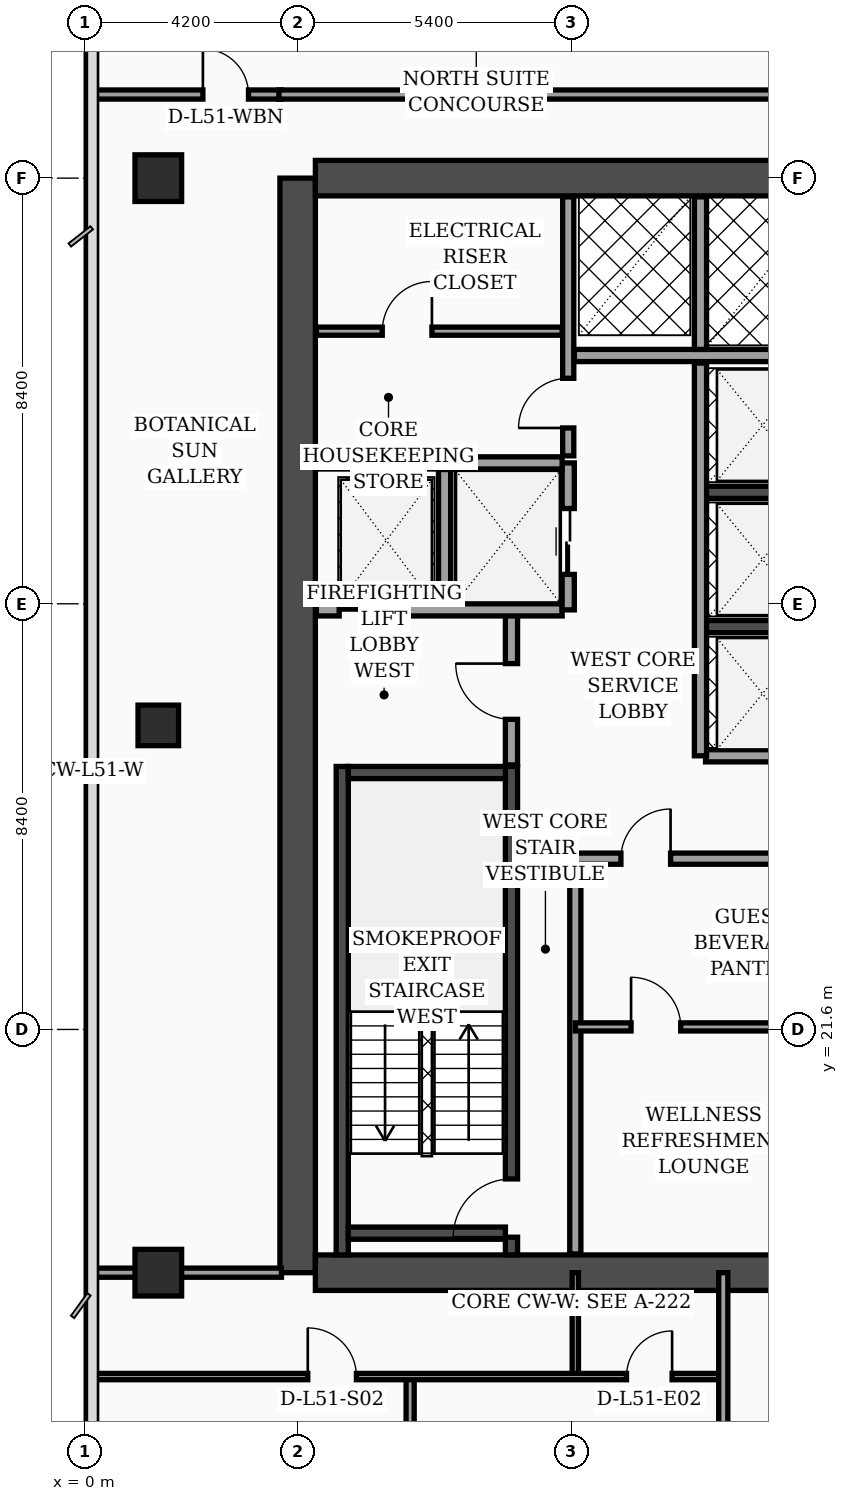
"""IFC4 building model, lengths in metres.
Left out: names, types, materials, properties, quantities, classifications, styles, units other than length and angle.
Written with IfcOpenShell. Run it as: python <this file> out.ifc"""

import sys

from ifc_helpers import new_model, si_unit, direction, frame, frame_2d, origin, origin_2d, place, context, subcontext, project, spatial, rectangle, extrude, element, fill, save


model = new_model("IFC4")
c1 = context("Model", 3, precision=1e-05, world=origin(), true_north=direction((0.0, 1.0)))
c2 = subcontext(c1, "Body", "Model", "MODEL_VIEW")
j1 = project(units=[si_unit("LENGTHUNIT", "METRE"), si_unit("PLANEANGLEUNIT", "RADIAN")], contexts=[c1])
p1 = place(None, origin())
s1 = spatial("IfcSite", under=j1, at=p1, CompositionType="ELEMENT")
p2 = place(p1, origin())
s2 = spatial("IfcBuilding", under=s1, at=p2, CompositionType="ELEMENT")
p3 = place(p2, frame((0.0, 0.0, 207.2)))
s3 = spatial("IfcBuildingStorey", under=s2, at=p3, CompositionType="ELEMENT", Elevation=207.2)
p4 = place(p3, frame((4.2, 16.8, 0.0), z_axis=(0.0, 0.0, 1.0), x_axis=(0.0, 1.0, 0.0)))
e1 = element("IfcWall", 1, at=p4, inside=s3, PredefinedType="SHEAR", context=c2, shape_type="SweptSolid", body=[
    extrude(rectangle(XDim=21.6, YDim=0.7, at=frame_2d((10.8, 0.0))), origin(), (0.0, 0.0, 1.0), 3.56),
])
for number, where, z_axis, x_axis in (
    (2, (4.55, 38.4, 0.0), (0.0, 0.0, 1.0), (1.0, 0.0, 0.0)),
    (3, (4.55, 16.8, 0.0), (0.0, 0.0, 1.0), (1.0, 0.0, 0.0)),
):
    element("IfcWall", number, at=place(p3, frame(where, z_axis=z_axis, x_axis=x_axis)), inside=s3, PredefinedType="SHEAR", context=c2, shape_type="SweptSolid", body=[
        extrude(rectangle(XDim=10.1, YDim=0.7, at=frame_2d((5.05, 0.0))), origin(), (0.0, 0.0, 1.0), 3.56),
    ])
p5 = place(p3, frame((5.08, 17.15, 0.0), z_axis=(0.0, 0.0, 1.0), x_axis=(0.0, 1.0, 0.0)))
e4 = element("IfcWall", 4, at=p5, inside=s3, PredefinedType="SOLIDWALL", context=c2, shape_type="SweptSolid", body=[
    extrude(rectangle(XDim=9.64, YDim=0.24, at=frame_2d((4.82, 0.0))), origin(), (0.0, 0.0, 1.0), 3.56),
])
p6 = place(p3, frame((8.42, 17.15, 0.0), z_axis=(0.0, 0.0, 1.0), x_axis=(0.0, 1.0, 0.0)))
e5 = element("IfcWall", 5, at=p6, inside=s3, PredefinedType="SOLIDWALL", context=c2, shape_type="SweptSolid", body=[
    extrude(rectangle(XDim=9.64, YDim=0.24, at=frame_2d((4.82, 0.0))), origin(), (0.0, 0.0, 1.0), 3.56),
])
p7 = place(p6, frame((0.35, 0.0, 0.0)))
e6 = element("IfcOpeningElement", 6, at=p7, cuts=e5, PredefinedType="OPENING", context=c2, shape_type="SweptSolid", body=[
    extrude(rectangle(XDim=1.15, YDim=2.2, at=frame_2d((0.575, 1.1))), frame((0.0, 0.13, 0.0), z_axis=(0.0, -1.0, 0.0), x_axis=(1.0, 0.0, 0.0)), (0.0, 0.0, 1.0), 0.26),
])
for number, where, z_axis, x_axis in (
    (7, (5.2, 17.58, 0.0), (0.0, 0.0, 1.0), (1.0, 0.0, 0.0)),
    (8, (5.2, 26.67, 0.0), (0.0, 0.0, 1.0), (1.0, 0.0, 0.0)),
):
    element("IfcWall", number, at=place(p3, frame(where, z_axis=z_axis, x_axis=x_axis)), inside=s3, PredefinedType="SOLIDWALL", context=c2, shape_type="SweptSolid", body=[
        extrude(rectangle(XDim=3.1, YDim=0.24, at=frame_2d((1.55, 0.0))), origin(), (0.0, 0.0, 1.0), 3.56),
    ])
for number, where, z_axis, x_axis in (
    (9, (12.18, 29.55, 0.0), (0.0, 0.0, 1.0), (1.0, 0.0, 0.0)),
    (10, (12.18, 32.2, 0.0), (0.0, 0.0, 1.0), (1.0, 0.0, 0.0)),
):
    element("IfcWall", number, at=place(p3, frame(where, z_axis=z_axis, x_axis=x_axis)), inside=s3, PredefinedType="SOLIDWALL", context=c2, shape_type="SweptSolid", body=[
        extrude(rectangle(XDim=2.47, YDim=0.24, at=frame_2d((1.235, 0.0))), origin(), (0.0, 0.0, 1.0), 3.56),
    ])
p8 = place(p3, frame((1.45, 16.8, 0.0), z_axis=(0.0, 0.0, 1.0), x_axis=(1.0, 0.0, 0.0)))
e11 = element("IfcColumn", 11, at=p8, inside=s3, PredefinedType="COLUMN", context=c2, shape_type="SweptSolid", body=[
    extrude(rectangle(XDim=0.92, YDim=0.92, at=origin_2d()), origin(), (0.0, 0.0, 1.0), 3.56),
])
p9 = place(p3, frame((1.45, 27.6, 0.0), z_axis=(0.0, 0.0, 1.0), x_axis=(1.0, 0.0, 0.0)))
e12 = element("IfcColumn", 12, at=p9, inside=s3, PredefinedType="COLUMN", context=c2, shape_type="SweptSolid", body=[
    extrude(rectangle(XDim=0.8, YDim=0.8, at=origin_2d()), origin(), (0.0, 0.0, 1.0), 3.56),
])
p10 = place(p3, frame((1.45, 38.4, 0.0), z_axis=(0.0, 0.0, 1.0), x_axis=(1.0, 0.0, 0.0)))
e13 = element("IfcColumn", 13, at=p10, inside=s3, PredefinedType="COLUMN", context=c2, shape_type="SweptSolid", body=[
    extrude(rectangle(XDim=0.92, YDim=0.92, at=origin_2d()), origin(), (0.0, 0.0, 1.0), 3.56),
])
p11 = place(p3, frame((8.42, 26.82, 0.0), z_axis=(0.0, 0.0, 1.0), x_axis=(0.0, 1.0, 0.0)))
e14 = element("IfcWall", 14, at=p11, inside=s3, PredefinedType="SOLIDWALL", context=c2, shape_type="SweptSolid", body=[
    extrude(rectangle(XDim=3.0, YDim=0.24, at=frame_2d((1.5, 0.0))), origin(), (0.0, 0.0, 1.0), 3.56),
])
p12 = place(p11, frame((0.9, 0.0, 0.0)))
e15 = element("IfcOpeningElement", 15, at=p12, cuts=e14, PredefinedType="OPENING", context=c2, shape_type="SweptSolid", body=[
    extrude(rectangle(XDim=1.1, YDim=2.2, at=frame_2d((0.55, 1.1))), frame((0.0, 0.13, 0.0), z_axis=(0.0, -1.0, 0.0), x_axis=(1.0, 0.0, 0.0)), (0.0, 0.0, 1.0), 0.26),
])
p13 = place(p3, frame((4.57, 29.88, 0.0), z_axis=(0.0, 0.0, 1.0), x_axis=(1.0, 0.0, 0.0)))
e16 = element("IfcWall", 16, at=p13, inside=s3, PredefinedType="SOLIDWALL", context=c2, shape_type="SweptSolid", body=[
    extrude(rectangle(XDim=4.85, YDim=0.24, at=frame_2d((2.425, 0.0))), origin(), (0.0, 0.0, 1.0), 3.56),
])
p14 = place(p13, frame((0.45, 0.0, 0.0)))
e17 = element("IfcOpeningElement", 17, at=p14, cuts=e16, PredefinedType="OPENING", context=c2, shape_type="SweptSolid", body=[
    extrude(rectangle(XDim=1.3, YDim=2.35, at=frame_2d((0.65, 1.175))), frame((0.0, 0.13, 0.0), z_axis=(0.0, -1.0, 0.0), x_axis=(1.0, 0.0, 0.0)), (0.0, 0.0, 1.0), 0.26),
])
p15 = place(p3, frame((7.1, 30.02, 0.0), z_axis=(0.0, 0.0, 1.0), x_axis=(0.0, 1.0, 0.0)))
e18 = element("IfcWall", 18, at=p15, inside=s3, PredefinedType="SOLIDWALL", context=c2, shape_type="SweptSolid", body=[
    extrude(rectangle(XDim=2.63, YDim=0.24, at=frame_2d((1.315, 0.0))), origin(), (0.0, 0.0, 1.0), 3.56),
])
p16 = place(p3, frame((9.54, 29.88, 0.0), z_axis=(0.0, 0.0, 1.0), x_axis=(0.0, 1.0, 0.0)))
e19 = element("IfcWall", 19, at=p16, inside=s3, PredefinedType="SOLIDWALL", context=c2, shape_type="SweptSolid", body=[
    extrude(rectangle(XDim=2.9, YDim=0.24, at=frame_2d((1.45, 0.0))), origin(), (0.0, 0.0, 1.0), 3.56),
])
p17 = place(p16, frame((0.7, 0.0, 0.0)))
e20 = element("IfcOpeningElement", 20, at=p17, cuts=e19, PredefinedType="OPENING", context=c2, shape_type="SweptSolid", body=[
    extrude(rectangle(XDim=1.3, YDim=2.35, at=frame_2d((0.65, 1.175))), frame((0.0, 0.13, 0.0), z_axis=(0.0, -1.0, 0.0), x_axis=(1.0, 0.0, 0.0)), (0.0, 0.0, 1.0), 0.26),
])
p18 = place(p3, frame((4.57, 32.78, 0.0), z_axis=(0.0, 0.0, 1.0), x_axis=(1.0, 0.0, 0.0)))
e21 = element("IfcWall", 21, at=p18, inside=s3, PredefinedType="SOLIDWALL", context=c2, shape_type="SweptSolid", body=[
    extrude(rectangle(XDim=4.85, YDim=0.24, at=frame_2d((2.425, 0.0))), origin(), (0.0, 0.0, 1.0), 3.19),
])
p19 = place(p3, frame((9.68, 17.17, 0.0), z_axis=(0.0, 0.0, 1.0), x_axis=(0.0, 1.0, 0.0)))
e22 = element("IfcWall", 22, at=p19, inside=s3, PredefinedType="SOLIDWALL", context=c2, shape_type="SweptSolid", body=[
    extrude(rectangle(XDim=7.83, YDim=0.22, at=frame_2d((3.915, 0.0))), origin(), (0.0, 0.0, 1.0), 3.56),
])
p20 = place(p3, frame((4.57, 35.38, 0.0), z_axis=(0.0, 0.0, 1.0), x_axis=(1.0, 0.0, 0.0)))
e23 = element("IfcWall", 23, at=p20, inside=s3, PredefinedType="PARTITIONING", context=c2, shape_type="SweptSolid", body=[
    extrude(rectangle(XDim=4.85, YDim=0.16, at=frame_2d((2.425, 0.0))), origin(), (0.0, 0.0, 1.0), 3.56),
])
p21 = place(p20, frame((1.3, 0.0, 0.0)))
e24 = element("IfcOpeningElement", 24, at=p21, cuts=e23, PredefinedType="OPENING", context=c2, shape_type="SweptSolid", body=[
    extrude(rectangle(XDim=0.98, YDim=2.15, at=frame_2d((0.49, 1.075))), frame((0.0, 0.09, 0.0), z_axis=(0.0, -1.0, 0.0), x_axis=(1.0, 0.0, 0.0)), (0.0, 0.0, 1.0), 0.18),
])
p22 = place(p3, frame((9.54, 32.92, 0.0), z_axis=(0.0, 0.0, 1.0), x_axis=(0.0, 1.0, 0.0)))
e25 = element("IfcWall", 25, at=p22, inside=s3, PredefinedType="SOLIDWALL", context=c2, shape_type="SweptSolid", body=[
    extrude(rectangle(XDim=5.11, YDim=0.22, at=frame_2d((2.555, 0.0))), origin(), (0.0, 0.0, 1.0), 3.56),
])
p23 = place(p22, frame((0.55, 0.0, 0.0)))
e26 = element("IfcOpeningElement", 26, at=p23, cuts=e25, PredefinedType="OPENING", context=c2, shape_type="SweptSolid", body=[
    extrude(rectangle(XDim=0.98, YDim=2.15, at=frame_2d((0.49, 1.075))), frame((0.0, 0.12, 0.0), z_axis=(0.0, -1.0, 0.0), x_axis=(1.0, 0.0, 0.0)), (0.0, 0.0, 1.0), 0.24),
])
p24 = place(p3, frame((9.68, 21.65, 0.0), z_axis=(0.0, 0.0, 1.0), x_axis=(1.0, 0.0, 0.0)))
e27 = element("IfcWall", 27, at=p24, inside=s3, PredefinedType="PARTITIONING", context=c2, shape_type="SweptSolid", body=[
    extrude(rectangle(XDim=4.95, YDim=0.16, at=frame_2d((2.475, 0.0))), origin(), (0.0, 0.0, 1.0), 3.09),
])
p25 = place(p24, frame((1.1, 0.0, 0.0)))
e28 = element("IfcOpeningElement", 28, at=p25, cuts=e27, PredefinedType="OPENING", context=c2, shape_type="SweptSolid", body=[
    extrude(rectangle(XDim=0.98, YDim=2.15, at=frame_2d((0.49, 1.075))), frame((0.0, 0.09, 0.0), z_axis=(0.0, -1.0, 0.0), x_axis=(1.0, 0.0, 0.0)), (0.0, 0.0, 1.0), 0.18),
])
p26 = place(p3, frame((9.68, 24.97, 0.0), z_axis=(0.0, 0.0, 1.0), x_axis=(1.0, 0.0, 0.0)))
e29 = element("IfcWall", 29, at=p26, inside=s3, PredefinedType="SOLIDWALL", context=c2, shape_type="SweptSolid", body=[
    extrude(rectangle(XDim=4.95, YDim=0.22, at=frame_2d((2.475, 0.0))), origin(), (0.0, 0.0, 1.0), 2.94),
])
p27 = place(p26, frame((0.9, 0.0, 0.0)))
e30 = element("IfcOpeningElement", 30, at=p27, cuts=e29, PredefinedType="OPENING", context=c2, shape_type="SweptSolid", body=[
    extrude(rectangle(XDim=0.98, YDim=2.15, at=frame_2d((0.49, 1.075))), frame((0.0, 0.12, 0.0), z_axis=(0.0, -1.0, 0.0), x_axis=(1.0, 0.0, 0.0)), (0.0, 0.0, 1.0), 0.24),
])
p28 = place(p3, frame((12.25, 27.0, 0.0), z_axis=(0.0, 0.0, 1.0), x_axis=(1.0, 0.0, 0.0)))
e31 = element("IfcWall", 31, at=p28, inside=s3, PredefinedType="SOLIDWALL", context=c2, shape_type="SweptSolid", body=[
    extrude(rectangle(XDim=2.38, YDim=0.24, at=frame_2d((1.19, 0.0))), origin(), (0.0, 0.0, 1.0), 3.56),
])
p29 = place(p3, frame((12.15, 27.0, 0.0), z_axis=(0.0, 0.0, 1.0), x_axis=(0.0, 1.0, 0.0)))
e32 = element("IfcWall", 32, at=p29, inside=s3, PredefinedType="SOLIDWALL", context=c2, shape_type="SweptSolid", body=[
    extrude(rectangle(XDim=7.75, YDim=0.24, at=frame_2d((3.875, 0.0))), origin(), (0.0, 0.0, 1.0), 3.56),
])
p30 = place(p3, frame((9.66, 34.9, 0.0), z_axis=(0.0, 0.0, 1.0), x_axis=(1.0, 0.0, 0.0)))
e33 = element("IfcWall", 33, at=p30, inside=s3, PredefinedType="SOLIDWALL", context=c2, shape_type="SweptSolid", body=[
    extrude(rectangle(XDim=4.97, YDim=0.24, at=frame_2d((2.485, 0.0))), origin(), (0.0, 0.0, 1.0), 3.56),
])
p31 = place(p3, frame((12.15, 35.02, 0.0), z_axis=(0.0, 0.0, 1.0), x_axis=(0.0, 1.0, 0.0)))
e34 = element("IfcWall", 34, at=p31, inside=s3, PredefinedType="SOLIDWALL", context=c2, shape_type="SweptSolid", body=[
    extrude(rectangle(XDim=3.01, YDim=0.24, at=frame_2d((1.505, 0.0))), origin(), (0.0, 0.0, 1.0), 3.56),
])
p32 = place(p3, frame((0.08, 16.8, 0.0), z_axis=(0.0, 0.0, 1.0), x_axis=(1.0, 0.0, 0.0)))
e35 = element("IfcWall", 35, at=p32, inside=s3, PredefinedType="PARTITIONING", context=c2, shape_type="SweptSolid", body=[
    extrude(rectangle(XDim=3.8, YDim=0.18, at=frame_2d((1.9, 0.0))), origin(), (0.0, 0.0, 1.0), 2.94),
])
p33 = place(p3, frame((0.08, 40.05, 0.0), z_axis=(0.0, 0.0, 1.0), x_axis=(1.0, 0.0, 0.0)))
e36 = element("IfcWall", 36, at=p33, inside=s3, PredefinedType="PARTITIONING", context=c2, shape_type="SweptSolid", body=[
    extrude(rectangle(XDim=3.8, YDim=0.18, at=frame_2d((1.9, 0.0))), origin(), (0.0, 0.0, 1.0), 2.94),
])
p34 = place(p33, frame((2.25, 0.0, 0.0)))
e37 = element("IfcOpeningElement", 37, at=p34, cuts=e36, PredefinedType="OPENING", context=c2, shape_type="SweptSolid", body=[
    extrude(rectangle(XDim=0.9, YDim=2.15, at=frame_2d((0.45, 1.075))), frame((0.0, 0.1, 0.0), z_axis=(0.0, -1.0, 0.0), x_axis=(1.0, 0.0, 0.0)), (0.0, 0.0, 1.0), 0.2),
])
p35 = place(p3, frame((9.68, 14.75, 0.0), z_axis=(0.0, 0.0, 1.0), x_axis=(0.0, 1.0, 0.0)))
e38 = element("IfcWall", 38, at=p35, inside=s3, PredefinedType="PARTITIONING", context=c2, shape_type="SweptSolid", body=[
    extrude(rectangle(XDim=2.05, YDim=0.125, at=frame_2d((1.025, 0.0))), origin(), (0.0, 0.0, 1.0), 3.56),
])
p36 = place(p3, frame((6.42, 11.05, 0.0), z_axis=(0.0, 0.0, 1.0), x_axis=(0.0, 1.0, 0.0)))
e39 = element("IfcWall", 39, at=p36, inside=s3, PredefinedType="PARTITIONING", context=c2, shape_type="SweptSolid", body=[
    extrude(rectangle(XDim=3.7, YDim=0.16, at=frame_2d((1.85, 0.0))), origin(), (0.0, 0.0, 1.0), 3.56),
])
p37 = place(p36, frame((1.37, 0.0, 0.0)))
e40 = element("IfcOpeningElement", 40, at=p37, cuts=e39, PredefinedType="OPENING", context=c2, shape_type="SweptSolid", body=[
    extrude(rectangle(XDim=0.96, YDim=2.2, at=frame_2d((0.48, 1.1))), frame((0.0, 0.09, 0.0), z_axis=(0.0, -1.0, 0.0), x_axis=(1.0, 0.0, 0.0)), (0.0, 0.0, 1.0), 0.18),
])
p38 = place(p3, frame((0.08, 14.75, 0.0), z_axis=(0.0, 0.0, 1.0), x_axis=(1.0, 0.0, 0.0)))
e41 = element("IfcWall", 41, at=p38, inside=s3, PredefinedType="PARTITIONING", context=c2, shape_type="SweptSolid", body=[
    extrude(rectangle(XDim=12.52, YDim=0.125, at=frame_2d((6.26, 0.0))), origin(), (0.0, 0.0, 1.0), 2.94),
])
p39 = place(p38, frame((4.32, 0.0, 0.0)))
e42 = element("IfcOpeningElement", 42, at=p39, cuts=e41, PredefinedType="OPENING", context=c2, shape_type="SweptSolid", body=[
    extrude(rectangle(XDim=0.96, YDim=2.2, at=frame_2d((0.48, 1.1))), frame((0.0, 0.073, 0.0), z_axis=(0.0, -1.0, 0.0), x_axis=(1.0, 0.0, 0.0)), (0.0, 0.0, 1.0), 0.145),
])
p40 = place(p38, frame((10.61, 0.0, 0.0)))
e43 = element("IfcOpeningElement", 43, at=p40, cuts=e41, PredefinedType="OPENING", context=c2, shape_type="SweptSolid", body=[
    extrude(rectangle(XDim=0.9, YDim=2.15, at=frame_2d((0.45, 1.075))), frame((0.0, 0.073, 0.0), z_axis=(0.0, -1.0, 0.0), x_axis=(1.0, 0.0, 0.0)), (0.0, 0.0, 1.0), 0.145),
])
p41 = place(p3, frame((12.6, 2.44, 0.0), z_axis=(0.0, 0.0, 1.0), x_axis=(0.0, 1.0, 0.0)))
e44 = element("IfcWall", 44, at=p41, inside=s3, PredefinedType="PARTITIONING", context=c2, shape_type="SweptSolid", body=[
    extrude(rectangle(XDim=14.36, YDim=0.18, at=frame_2d((7.18, 0.0))), origin(), (0.0, 0.0, 1.0), 2.94),
])
p42 = place(p41, frame((3.01, 0.0, 0.0)))
e45 = element("IfcOpeningElement", 45, at=p42, cuts=e44, PredefinedType="OPENING", context=c2, shape_type="SweptSolid", body=[
    extrude(rectangle(XDim=1.02, YDim=2.2, at=frame_2d((0.51, 1.1))), frame((0.0, 0.1, 0.0), z_axis=(0.0, -1.0, 0.0), x_axis=(1.0, 0.0, 0.0)), (0.0, 0.0, 1.0), 0.2),
])
p43 = place(p41, frame((9.95, 0.0, 0.0)))
e46 = element("IfcOpeningElement", 46, at=p43, cuts=e44, PredefinedType="OPENING", context=c2, shape_type="SweptSolid", body=[
    extrude(rectangle(XDim=1.02, YDim=2.2, at=frame_2d((0.51, 1.1))), frame((0.0, 0.1, 0.0), z_axis=(0.0, -1.0, 0.0), x_axis=(1.0, 0.0, 0.0)), (0.0, 0.0, 1.0), 0.2),
])
p44 = place(p3, frame((3.83, 40.05, 0.0), z_axis=(0.0, 0.0, 1.0), x_axis=(1.0, 0.0, 0.0)))
e47 = element("IfcWall", 47, at=p44, inside=s3, PredefinedType="PARTITIONING", context=c2, shape_type="SweptSolid", body=[
    extrude(rectangle(XDim=11.32, YDim=0.18, at=frame_2d((5.66, 0.0))), origin(), (0.0, 0.0, 1.0), 2.94),
])
p45 = place(p12, origin())
e48 = element("IfcDoor", 48, at=p45, inside=s3, OperationType="SINGLE_SWING_RIGHT", PredefinedType="DOOR", context=c2, shape_type="SweptSolid", body=[
    extrude(rectangle(XDim=1.1, YDim=2.2, at=frame_2d((0.55, 1.1))), frame((0.0, 0.025, 0.0), z_axis=(0.0, -1.0, 0.0), x_axis=(1.0, 0.0, 0.0)), (0.0, 0.0, 1.0), 0.05),
])
fill(e15, e48)
p46 = place(p14, origin())
e49 = element("IfcDoor", 49, at=p46, inside=s3, OperationType="DOUBLE_DOOR_SLIDING", PredefinedType="DOOR", context=c2, shape_type="SweptSolid", body=[
    extrude(rectangle(XDim=1.3, YDim=2.35, at=frame_2d((0.65, 1.175))), frame((0.0, 0.025, 0.0), z_axis=(0.0, -1.0, 0.0), x_axis=(1.0, 0.0, 0.0)), (0.0, 0.0, 1.0), 0.05),
])
fill(e17, e49)
p47 = place(p17, origin())
e50 = element("IfcDoor", 50, at=p47, inside=s3, OperationType="DOUBLE_DOOR_SLIDING", PredefinedType="DOOR", context=c2, shape_type="SweptSolid", body=[
    extrude(rectangle(XDim=1.3, YDim=2.35, at=frame_2d((0.65, 1.175))), frame((0.0, 0.025, 0.0), z_axis=(0.0, -1.0, 0.0), x_axis=(1.0, 0.0, 0.0)), (0.0, 0.0, 1.0), 0.05),
])
fill(e20, e50)
p48 = place(p21, origin())
e51 = element("IfcDoor", 51, at=p48, inside=s3, OperationType="SINGLE_SWING_RIGHT", PredefinedType="DOOR", context=c2, shape_type="SweptSolid", body=[
    extrude(rectangle(XDim=0.98, YDim=2.15, at=frame_2d((0.49, 1.075))), frame((0.0, 0.025, 0.0), z_axis=(0.0, -1.0, 0.0), x_axis=(1.0, 0.0, 0.0)), (0.0, 0.0, 1.0), 0.05),
])
fill(e24, e51)
p49 = place(p23, origin())
e52 = element("IfcDoor", 52, at=p49, inside=s3, OperationType="SINGLE_SWING_LEFT", PredefinedType="DOOR", context=c2, shape_type="SweptSolid", body=[
    extrude(rectangle(XDim=0.98, YDim=2.15, at=frame_2d((0.49, 1.075))), frame((0.0, 0.025, 0.0), z_axis=(0.0, -1.0, 0.0), x_axis=(1.0, 0.0, 0.0)), (0.0, 0.0, 1.0), 0.05),
])
fill(e26, e52)
p50 = place(p25, origin())
e53 = element("IfcDoor", 53, at=p50, inside=s3, OperationType="SINGLE_SWING_LEFT", PredefinedType="DOOR", context=c2, shape_type="SweptSolid", body=[
    extrude(rectangle(XDim=0.98, YDim=2.15, at=frame_2d((0.49, 1.075))), frame((0.0, 0.025, 0.0), z_axis=(0.0, -1.0, 0.0), x_axis=(1.0, 0.0, 0.0)), (0.0, 0.0, 1.0), 0.05),
])
fill(e28, e53)
p51 = place(p27, origin())
e54 = element("IfcDoor", 54, at=p51, inside=s3, OperationType="SINGLE_SWING_RIGHT", PredefinedType="DOOR", context=c2, shape_type="SweptSolid", body=[
    extrude(rectangle(XDim=0.98, YDim=2.15, at=frame_2d((0.49, 1.075))), frame((0.0, 0.025, 0.0), z_axis=(0.0, -1.0, 0.0), x_axis=(1.0, 0.0, 0.0)), (0.0, 0.0, 1.0), 0.05),
])
fill(e30, e54)
p52 = place(p34, origin())
e55 = element("IfcDoor", 55, at=p52, inside=s3, OperationType="SINGLE_SWING_LEFT", PredefinedType="DOOR", context=c2, shape_type="SweptSolid", body=[
    extrude(rectangle(XDim=0.9, YDim=2.15, at=frame_2d((0.45, 1.075))), frame((0.0, 0.025, 0.0), z_axis=(0.0, -1.0, 0.0), x_axis=(1.0, 0.0, 0.0)), (0.0, 0.0, 1.0), 0.05),
])
fill(e37, e55)
p53 = place(p39, origin())
e56 = element("IfcDoor", 56, at=p53, inside=s3, OperationType="SINGLE_SWING_LEFT", PredefinedType="DOOR", context=c2, shape_type="SweptSolid", body=[
    extrude(rectangle(XDim=0.96, YDim=2.2, at=frame_2d((0.48, 1.1))), frame((0.0, 0.025, 0.0), z_axis=(0.0, -1.0, 0.0), x_axis=(1.0, 0.0, 0.0)), (0.0, 0.0, 1.0), 0.05),
])
fill(e42, e56)
p54 = place(p40, origin())
e57 = element("IfcDoor", 57, at=p54, inside=s3, OperationType="SINGLE_SWING_RIGHT", PredefinedType="DOOR", context=c2, shape_type="SweptSolid", body=[
    extrude(rectangle(XDim=0.9, YDim=2.15, at=frame_2d((0.45, 1.075))), frame((0.0, 0.025, 0.0), z_axis=(0.0, -1.0, 0.0), x_axis=(1.0, 0.0, 0.0)), (0.0, 0.0, 1.0), 0.05),
])
fill(e43, e57)
p55 = place(p7, origin())
e58 = element("IfcDoor", 58, at=p55, inside=s3, OperationType="SINGLE_SWING_LEFT", PredefinedType="DOOR", context=c2, shape_type="SweptSolid", body=[
    extrude(rectangle(XDim=1.15, YDim=2.2, at=frame_2d((0.575, 1.1))), frame((0.0, 0.025, 0.0), z_axis=(0.0, -1.0, 0.0), x_axis=(1.0, 0.0, 0.0)), (0.0, 0.0, 1.0), 0.05),
])
fill(e6, e58)
save(model, sys.argv[1])
